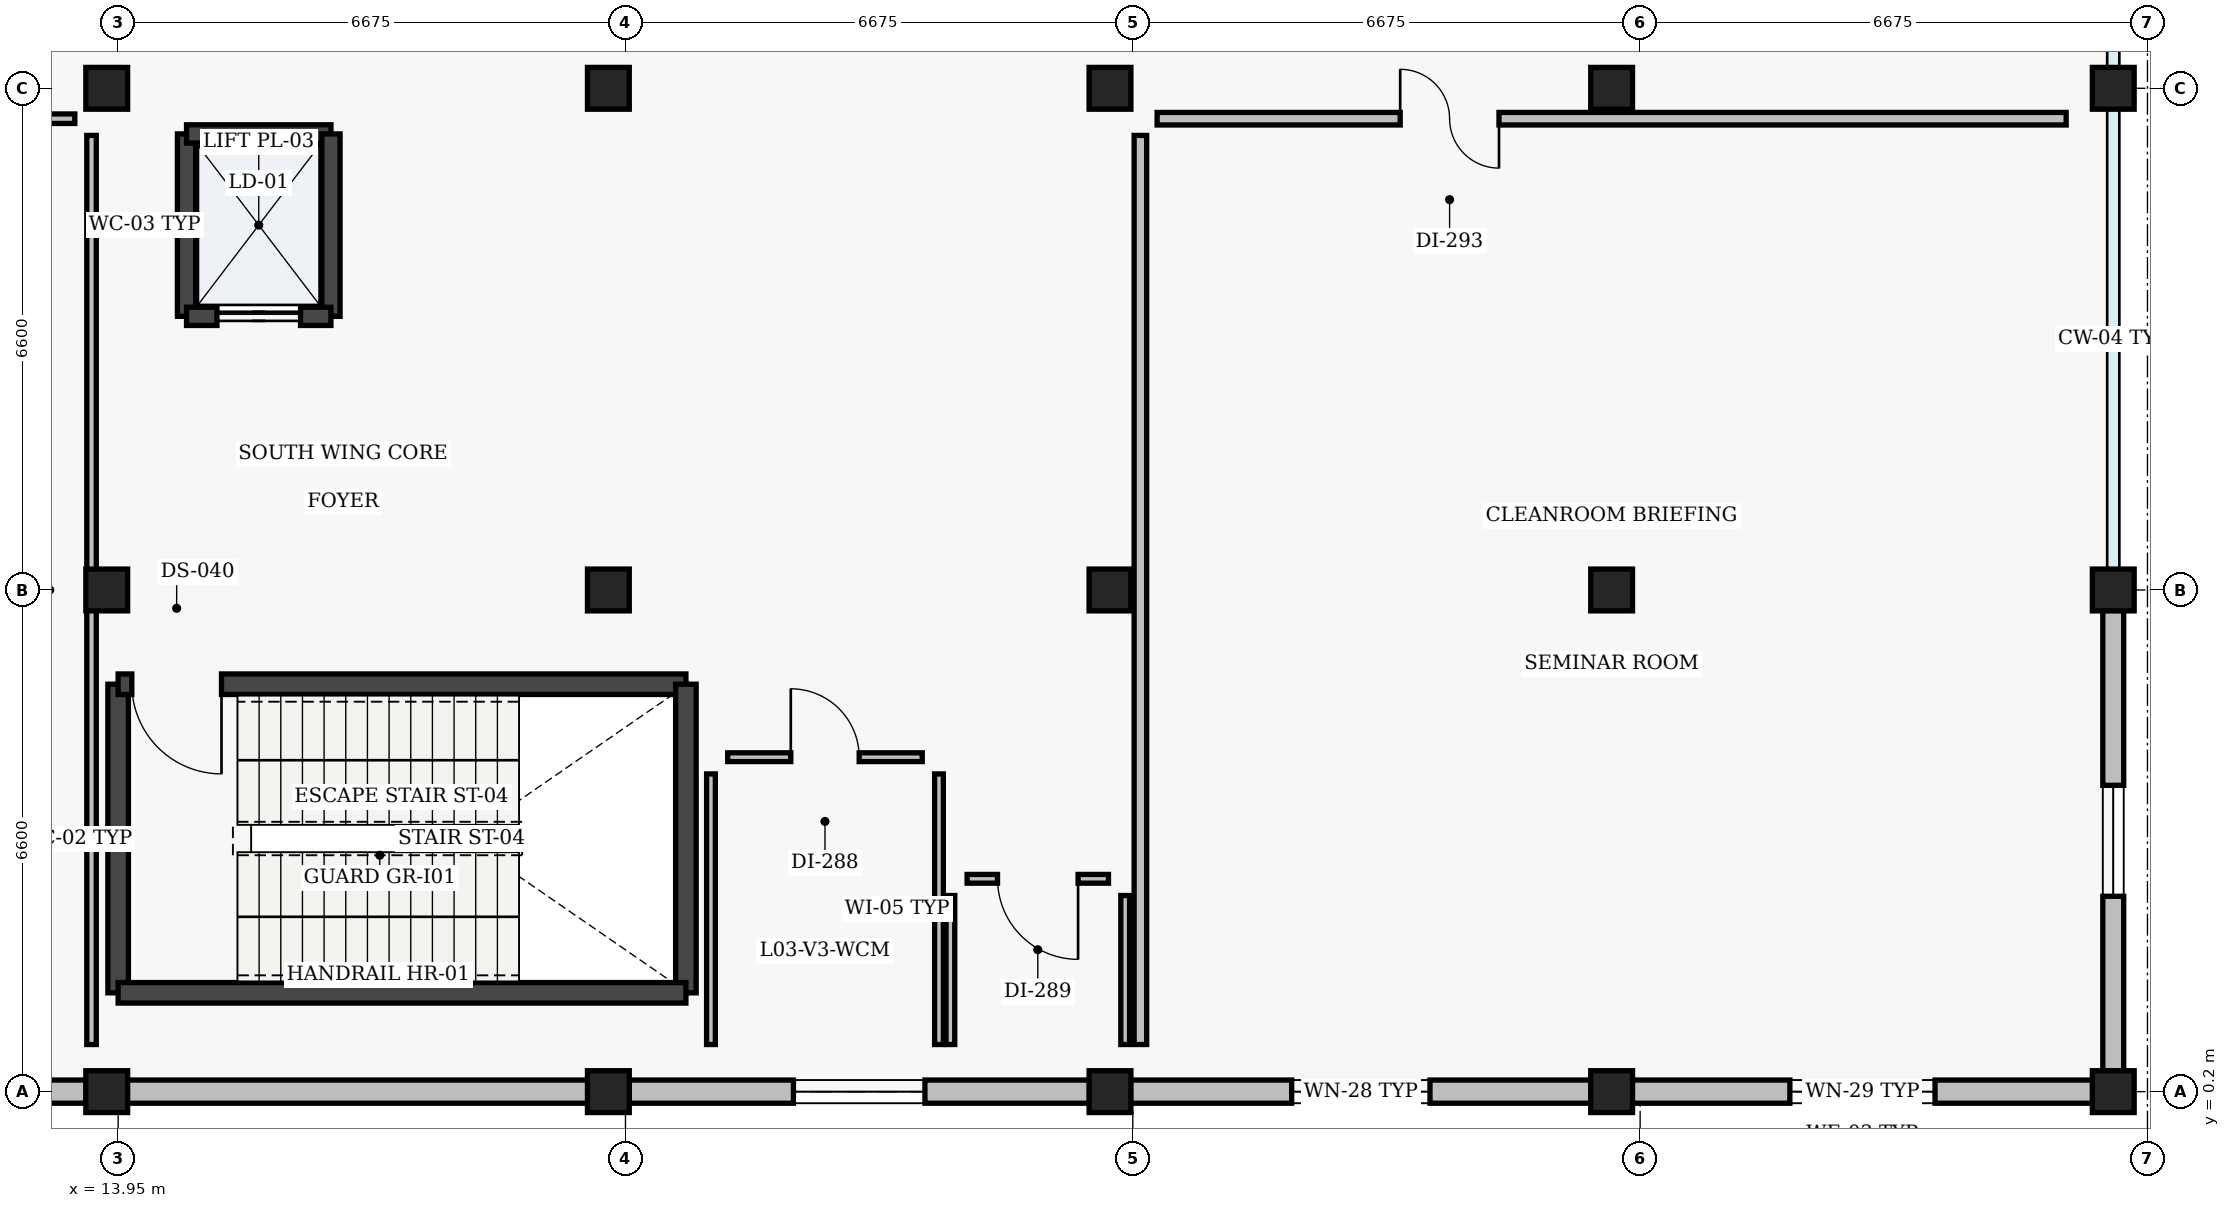
"""IFC4 building model, lengths in metres.
Left out: names, types, materials, properties, quantities, classifications, styles, units other than length and angle.
Written with IfcOpenShell. Run it as: python <this file> out.ifc"""

import sys

from ifc_helpers import new_model, si_unit, direction, frame, frame_2d, origin, origin_2d, place, context, subcontext, project, spatial, rectangle, extrude, element, fill, save


model = new_model("IFC4")
c1 = context("Model", 3, precision=1e-05, world=origin(), true_north=direction((0.0, 1.0)))
c2 = subcontext(c1, "Body", "Model", "MODEL_VIEW")
j1 = project(units=[si_unit("LENGTHUNIT", "METRE"), si_unit("PLANEANGLEUNIT", "RADIAN")], contexts=[c1])
p1 = place(None, origin())
s1 = spatial("IfcSite", under=j1, at=p1, CompositionType="ELEMENT")
p2 = place(p1, origin())
s2 = spatial("IfcBuilding", under=s1, at=p2, CompositionType="ELEMENT")
p3 = place(p2, frame((0.0, 0.0, 14.1)))
s3 = spatial("IfcBuildingStorey", under=s2, at=p3, CompositionType="ELEMENT", Elevation=14.1)
for number, where, z_axis, x_axis in (
    (1, (13.8, 0.2, 0.0), (0.0, 0.0, 1.0), (1.0, 0.0, 0.0)),
    (2, (13.8, 6.8, 0.0), (0.0, 0.0, 1.0), (1.0, 0.0, 0.0)),
    (3, (13.8, 13.4, 0.0), (0.0, 0.0, 1.0), (1.0, 0.0, 0.0)),
    (4, (20.4, 0.2, 0.0), (0.0, 0.0, 1.0), (1.0, 0.0, 0.0)),
    (5, (20.4, 6.8, 0.0), (0.0, 0.0, 1.0), (1.0, 0.0, 0.0)),
    (6, (20.4, 13.4, 0.0), (0.0, 0.0, 1.0), (1.0, 0.0, 0.0)),
    (7, (27.0, 0.2, 0.0), (0.0, 0.0, 1.0), (1.0, 0.0, 0.0)),
    (8, (27.0, 6.8, 0.0), (0.0, 0.0, 1.0), (1.0, 0.0, 0.0)),
    (9, (27.0, 13.4, 0.0), (0.0, 0.0, 1.0), (1.0, 0.0, 0.0)),
    (10, (33.6, 0.2, 0.0), (0.0, 0.0, 1.0), (1.0, 0.0, 0.0)),
    (11, (33.6, 6.8, 0.0), (0.0, 0.0, 1.0), (1.0, 0.0, 0.0)),
    (12, (33.6, 13.4, 0.0), (0.0, 0.0, 1.0), (1.0, 0.0, 0.0)),
    (13, (40.2, 0.2, 0.0), (0.0, 0.0, 1.0), (1.0, 0.0, 0.0)),
    (14, (40.2, 6.8, 0.0), (0.0, 0.0, 1.0), (1.0, 0.0, 0.0)),
    (15, (40.2, 13.4, 0.0), (0.0, 0.0, 1.0), (1.0, 0.0, 0.0)),
):
    element("IfcColumn", number, at=place(p3, frame(where, z_axis=z_axis, x_axis=x_axis)), inside=s3, PredefinedType="COLUMN", context=c2, shape_type="SweptSolid", body=[
        extrude(rectangle(XDim=0.55, YDim=0.55, at=origin_2d()), origin(), (0.0, 0.0, 1.0), 4.3),
    ])
p4 = place(p3, frame((40.2, 6.53, 0.0), z_axis=(0.0, 0.0, 1.0), x_axis=(0.0, -1.0, 0.0)))
e16 = element("IfcWall", 16, at=p4, inside=s3, PredefinedType="STANDARD", context=c2, shape_type="SweptSolid", body=[
    extrude(rectangle(XDim=6.06, YDim=0.275, at=frame_2d((3.03, 0.0))), origin(), (0.0, 0.0, 1.0), 3.785),
])
p5 = place(p4, frame((2.3, 0.0, 0.95)))
e17 = element("IfcOpeningElement", 17, at=p5, cuts=e16, PredefinedType="OPENING", context=c2, shape_type="SweptSolid", body=[
    extrude(rectangle(XDim=1.46, YDim=1.44, at=frame_2d((0.73, 0.72))), frame((0.0, 0.137, 0.0), z_axis=(0.0, -1.0, 0.0), x_axis=(1.0, 0.0, 0.0)), (0.0, 0.0, 1.0), 0.275),
])
p6 = place(p3, frame((39.93, 0.2, 0.0), z_axis=(0.0, 0.0, 1.0), x_axis=(-1.0, 0.0, 0.0)))
e18 = element("IfcWall", 18, at=p6, inside=s3, PredefinedType="STANDARD", context=c2, shape_type="SweptSolid", body=[
    extrude(rectangle(XDim=6.06, YDim=0.305, at=frame_2d((3.03, 0.0))), origin(), (0.0, 0.0, 1.0), 3.785),
])
p7 = place(p6, frame((2.075, 0.0, 0.95)))
e19 = element("IfcOpeningElement", 19, at=p7, cuts=e18, PredefinedType="OPENING", context=c2, shape_type="SweptSolid", body=[
    extrude(rectangle(XDim=1.91, YDim=1.4, at=frame_2d((0.955, 0.7))), frame((0.0, 0.152, 0.0), z_axis=(0.0, -1.0, 0.0), x_axis=(1.0, 0.0, 0.0)), (0.0, 0.0, 1.0), 0.305),
])
p8 = place(p3, frame((33.33, 0.2, 0.0), z_axis=(0.0, 0.0, 1.0), x_axis=(-1.0, 0.0, 0.0)))
e20 = element("IfcWall", 20, at=p8, inside=s3, PredefinedType="STANDARD", context=c2, shape_type="SweptSolid", body=[
    extrude(rectangle(XDim=6.06, YDim=0.305, at=frame_2d((3.03, 0.0))), origin(), (0.0, 0.0, 1.0), 3.785),
])
p9 = place(p8, frame((2.12, 0.0, 0.95)))
e21 = element("IfcOpeningElement", 21, at=p9, cuts=e20, PredefinedType="OPENING", context=c2, shape_type="SweptSolid", body=[
    extrude(rectangle(XDim=1.82, YDim=1.38, at=frame_2d((0.91, 0.69))), frame((0.0, 0.152, 0.0), z_axis=(0.0, -1.0, 0.0), x_axis=(1.0, 0.0, 0.0)), (0.0, 0.0, 1.0), 0.305),
])
p10 = place(p3, frame((26.73, 0.2, 0.0), z_axis=(0.0, 0.0, 1.0), x_axis=(-1.0, 0.0, 0.0)))
e22 = element("IfcWall", 22, at=p10, inside=s3, PredefinedType="STANDARD", context=c2, shape_type="SweptSolid", body=[
    extrude(rectangle(XDim=6.06, YDim=0.305, at=frame_2d((3.03, 0.0))), origin(), (0.0, 0.0, 1.0), 3.785),
])
p11 = place(p10, frame((2.165, 0.0, 0.95)))
e23 = element("IfcOpeningElement", 23, at=p11, cuts=e22, PredefinedType="OPENING", context=c2, shape_type="SweptSolid", body=[
    extrude(rectangle(XDim=1.73, YDim=1.36, at=frame_2d((0.865, 0.68))), frame((0.0, 0.152, 0.0), z_axis=(0.0, -1.0, 0.0), x_axis=(1.0, 0.0, 0.0)), (0.0, 0.0, 1.0), 0.305),
])
p12 = place(p3, frame((20.13, 0.2, 0.0), z_axis=(0.0, 0.0, 1.0), x_axis=(-1.0, 0.0, 0.0)))
e24 = element("IfcWall", 24, at=p12, inside=s3, PredefinedType="STANDARD", context=c2, shape_type="SweptSolid", body=[
    extrude(rectangle(XDim=6.06, YDim=0.305, at=frame_2d((3.03, 0.0))), origin(), (0.0, 0.0, 1.0), 3.785),
])
p13 = place(p3, frame((13.53, 0.2, 0.0), z_axis=(0.0, 0.0, 1.0), x_axis=(-1.0, 0.0, 0.0)))
e25 = element("IfcWall", 25, at=p13, inside=s3, PredefinedType="STANDARD", context=c2, shape_type="SweptSolid", body=[
    extrude(rectangle(XDim=6.06, YDim=0.305, at=frame_2d((3.03, 0.0))), origin(), (0.0, 0.0, 1.0), 3.785),
])
p14 = place(p13, frame((2.255, 0.0, 0.95)))
e26 = element("IfcOpeningElement", 26, at=p14, cuts=e25, PredefinedType="OPENING", context=c2, shape_type="SweptSolid", body=[
    extrude(rectangle(XDim=1.55, YDim=1.46, at=frame_2d((0.775, 0.73))), frame((0.0, 0.152, 0.0), z_axis=(0.0, -1.0, 0.0), x_axis=(1.0, 0.0, 0.0)), (0.0, 0.0, 1.0), 0.305),
])
p15 = place(p3, frame((13.95, 1.5, 0.0), z_axis=(0.0, 0.0, 1.0), x_axis=(0.0, 1.0, 0.0)))
e27 = element("IfcWall", 27, at=p15, inside=s3, PredefinedType="SHEAR", context=c2, shape_type="SweptSolid", body=[
    extrude(rectangle(XDim=4.06, YDim=0.27, at=frame_2d((2.03, 0.0))), origin(), (0.0, 0.0, 1.0), 4.28),
])
p16 = place(p3, frame((13.95, 5.56, 0.0), z_axis=(0.0, 0.0, 1.0), x_axis=(1.0, 0.0, 0.0)))
e28 = element("IfcWall", 28, at=p16, inside=s3, PredefinedType="SHEAR", context=c2, shape_type="SweptSolid", body=[
    extrude(rectangle(XDim=7.47, YDim=0.27, at=frame_2d((3.735, 0.0))), origin(), (0.0, 0.0, 1.0), 4.28),
])
p17 = place(p16, frame((0.18, 0.0, 0.0)))
e29 = element("IfcOpeningElement", 29, at=p17, cuts=e28, PredefinedType="OPENING", context=c2, shape_type="SweptSolid", body=[
    extrude(rectangle(XDim=1.18, YDim=2.15, at=frame_2d((0.59, 1.075))), frame((0.0, 0.135, 0.0), z_axis=(0.0, -1.0, 0.0), x_axis=(1.0, 0.0, 0.0)), (0.0, 0.0, 1.0), 0.27),
])
p18 = place(p3, frame((21.42, 5.56, 0.0), z_axis=(0.0, 0.0, 1.0), x_axis=(0.0, -1.0, 0.0)))
e30 = element("IfcWall", 30, at=p18, inside=s3, PredefinedType="SHEAR", context=c2, shape_type="SweptSolid", body=[
    extrude(rectangle(XDim=4.06, YDim=0.27, at=frame_2d((2.03, 0.0))), origin(), (0.0, 0.0, 1.0), 4.28),
])
p19 = place(p3, frame((21.42, 1.5, 0.0), z_axis=(0.0, 0.0, 1.0), x_axis=(-1.0, 0.0, 0.0)))
e31 = element("IfcWall", 31, at=p19, inside=s3, PredefinedType="SHEAR", context=c2, shape_type="SweptSolid", body=[
    extrude(rectangle(XDim=7.47, YDim=0.27, at=frame_2d((3.735, 0.0))), origin(), (0.0, 0.0, 1.0), 4.28),
])
p20 = place(p3, frame((14.85, 10.4, 0.0), z_axis=(0.0, 0.0, 1.0), x_axis=(0.0, 1.0, 0.0)))
e32 = element("IfcWall", 32, at=p20, inside=s3, PredefinedType="SHEAR", context=c2, shape_type="SweptSolid", body=[
    extrude(rectangle(XDim=2.4, YDim=0.24, at=frame_2d((1.2, 0.0))), origin(), (0.0, 0.0, 1.0), 4.28),
])
p21 = place(p3, frame((14.85, 12.8, 0.0), z_axis=(0.0, 0.0, 1.0), x_axis=(1.0, 0.0, 0.0)))
e33 = element("IfcWall", 33, at=p21, inside=s3, PredefinedType="SHEAR", context=c2, shape_type="SweptSolid", body=[
    extrude(rectangle(XDim=1.9, YDim=0.24, at=frame_2d((0.95, 0.0))), origin(), (0.0, 0.0, 1.0), 4.28),
])
p22 = place(p3, frame((16.75, 12.8, 0.0), z_axis=(0.0, 0.0, 1.0), x_axis=(0.0, -1.0, 0.0)))
e34 = element("IfcWall", 34, at=p22, inside=s3, PredefinedType="SHEAR", context=c2, shape_type="SweptSolid", body=[
    extrude(rectangle(XDim=2.4, YDim=0.24, at=frame_2d((1.2, 0.0))), origin(), (0.0, 0.0, 1.0), 4.28),
])
p23 = place(p3, frame((16.75, 10.4, 0.0), z_axis=(0.0, 0.0, 1.0), x_axis=(-1.0, 0.0, 0.0)))
e35 = element("IfcWall", 35, at=p23, inside=s3, PredefinedType="SHEAR", context=c2, shape_type="SweptSolid", body=[
    extrude(rectangle(XDim=1.9, YDim=0.24, at=frame_2d((0.95, 0.0))), origin(), (0.0, 0.0, 1.0), 4.28),
])
p24 = place(p23, frame((0.4, 0.0, 0.0)))
e36 = element("IfcOpeningElement", 36, at=p24, cuts=e35, PredefinedType="OPENING", context=c2, shape_type="SweptSolid", body=[
    extrude(rectangle(XDim=1.1, YDim=2.2, at=frame_2d((0.55, 1.1))), frame((0.0, 0.12, 0.0), z_axis=(0.0, -1.0, 0.0), x_axis=(1.0, 0.0, 0.0)), (0.0, 0.0, 1.0), 0.24),
])
p25 = place(p3, frame((24.75, 0.82, 0.0), z_axis=(0.0, 0.0, 1.0), x_axis=(0.0, 1.0, 0.0)))
e37 = element("IfcWall", 37, at=p25, inside=s3, PredefinedType="PARTITIONING", context=c2, shape_type="SweptSolid", body=[
    extrude(rectangle(XDim=3.56, YDim=0.115, at=frame_2d((1.78, 0.0))), origin(), (0.0, 0.0, 1.0), 3.95),
])
p26 = place(p3, frame((24.53, 4.6, 0.0), z_axis=(0.0, 0.0, 1.0), x_axis=(-1.0, 0.0, 0.0)))
e38 = element("IfcWall", 38, at=p26, inside=s3, PredefinedType="PARTITIONING", context=c2, shape_type="SweptSolid", body=[
    extrude(rectangle(XDim=2.56, YDim=0.115, at=frame_2d((1.28, 0.0))), origin(), (0.0, 0.0, 1.0), 3.95),
])
p27 = place(p26, frame((0.83, 0.0, 0.0)))
e39 = element("IfcOpeningElement", 39, at=p27, cuts=e38, PredefinedType="OPENING", context=c2, shape_type="SweptSolid", body=[
    extrude(rectangle(XDim=0.9, YDim=2.1, at=frame_2d((0.45, 1.05))), frame((0.0, 0.058, 0.0), z_axis=(0.0, -1.0, 0.0), x_axis=(1.0, 0.0, 0.0)), (0.0, 0.0, 1.0), 0.115),
])
p28 = place(p3, frame((21.75, 4.38, 0.0), z_axis=(0.0, 0.0, 1.0), x_axis=(0.0, -1.0, 0.0)))
e40 = element("IfcWall", 40, at=p28, inside=s3, PredefinedType="PARTITIONING", context=c2, shape_type="SweptSolid", body=[
    extrude(rectangle(XDim=3.56, YDim=0.115, at=frame_2d((1.78, 0.0))), origin(), (0.0, 0.0, 1.0), 3.95),
])
p29 = place(p3, frame((27.2, 0.82, 0.0), z_axis=(0.0, 0.0, 1.0), x_axis=(0.0, 1.0, 0.0)))
e41 = element("IfcWall", 41, at=p29, inside=s3, PredefinedType="PARTITIONING", context=c2, shape_type="SweptSolid", body=[
    extrude(rectangle(XDim=1.96, YDim=0.115, at=frame_2d((0.98, 0.0))), origin(), (0.0, 0.0, 1.0), 3.685),
])
p30 = place(p3, frame((26.98, 3.0, 0.0), z_axis=(0.0, 0.0, 1.0), x_axis=(-1.0, 0.0, 0.0)))
e42 = element("IfcWall", 42, at=p30, inside=s3, PredefinedType="PARTITIONING", context=c2, shape_type="SweptSolid", body=[
    extrude(rectangle(XDim=1.86, YDim=0.115, at=frame_2d((0.93, 0.0))), origin(), (0.0, 0.0, 1.0), 3.95),
])
p31 = place(p30, frame((0.4, 0.0, 0.0)))
e43 = element("IfcOpeningElement", 43, at=p31, cuts=e42, PredefinedType="OPENING", context=c2, shape_type="SweptSolid", body=[
    extrude(rectangle(XDim=1.06, YDim=2.12, at=frame_2d((0.53, 1.06))), frame((0.0, 0.058, 0.0), z_axis=(0.0, -1.0, 0.0), x_axis=(1.0, 0.0, 0.0)), (0.0, 0.0, 1.0), 0.115),
])
p32 = place(p3, frame((24.9, 2.78, 0.0), z_axis=(0.0, 0.0, 1.0), x_axis=(0.0, -1.0, 0.0)))
e44 = element("IfcWall", 44, at=p32, inside=s3, PredefinedType="PARTITIONING", context=c2, shape_type="SweptSolid", body=[
    extrude(rectangle(XDim=1.96, YDim=0.115, at=frame_2d((0.98, 0.0))), origin(), (0.0, 0.0, 1.0), 3.95),
])
p33 = place(p3, frame((13.6, 0.82, 0.0), z_axis=(0.0, 0.0, 1.0), x_axis=(0.0, 1.0, 0.0)))
e45 = element("IfcWall", 45, at=p33, inside=s3, PredefinedType="PARTITIONING", context=c2, shape_type="SweptSolid", body=[
    extrude(rectangle(XDim=11.96, YDim=0.125, at=frame_2d((5.98, 0.0))), origin(), (0.0, 0.0, 1.0), 3.685),
])
p34 = place(p3, frame((13.38, 13.0, 0.0), z_axis=(0.0, 0.0, 1.0), x_axis=(-1.0, 0.0, 0.0)))
e46 = element("IfcWall", 46, at=p34, inside=s3, PredefinedType="PARTITIONING", context=c2, shape_type="SweptSolid", body=[
    extrude(rectangle(XDim=12.16, YDim=0.125, at=frame_2d((6.08, 0.0))), origin(), (0.0, 0.0, 1.0), 3.95),
])
p35 = place(p34, frame((4.488, 0.0, 0.0)))
e47 = element("IfcOpeningElement", 47, at=p35, cuts=e46, PredefinedType="OPENING", context=c2, shape_type="SweptSolid", body=[
    extrude(rectangle(XDim=0.94, YDim=2.12, at=frame_2d((0.47, 1.06))), frame((0.0, 0.062, 0.0), z_axis=(0.0, -1.0, 0.0), x_axis=(1.0, 0.0, 0.0)), (0.0, 0.0, 1.0), 0.125),
])
p36 = place(p3, frame((39.58, 13.0, 0.0), z_axis=(0.0, 0.0, 1.0), x_axis=(-1.0, 0.0, 0.0)))
e48 = element("IfcWall", 48, at=p36, inside=s3, PredefinedType="PARTITIONING", context=c2, shape_type="SweptSolid", body=[
    extrude(rectangle(XDim=11.96, YDim=0.165, at=frame_2d((5.98, 0.0))), origin(), (0.0, 0.0, 1.0), 3.95),
])
p37 = place(p36, frame((7.462, 0.0, 0.0)))
e49 = element("IfcOpeningElement", 49, at=p37, cuts=e48, PredefinedType="OPENING", context=c2, shape_type="SweptSolid", body=[
    extrude(rectangle(XDim=1.3, YDim=2.18, at=frame_2d((0.65, 1.09))), frame((0.0, 0.083, 0.0), z_axis=(0.0, -1.0, 0.0), x_axis=(1.0, 0.0, 0.0)), (0.0, 0.0, 1.0), 0.165),
])
p38 = place(p3, frame((27.4, 12.78, 0.0), z_axis=(0.0, 0.0, 1.0), x_axis=(0.0, -1.0, 0.0)))
e50 = element("IfcWall", 50, at=p38, inside=s3, PredefinedType="PARTITIONING", context=c2, shape_type="SweptSolid", body=[
    extrude(rectangle(XDim=11.96, YDim=0.165, at=frame_2d((5.98, 0.0))), origin(), (0.0, 0.0, 1.0), 3.95),
])
p39 = place(p5, origin())
e51 = element("IfcWindow", 51, at=p39, inside=s3, PartitioningType="SINGLE_PANEL", PredefinedType="WINDOW", context=c2, shape_type="SweptSolid", body=[
    extrude(rectangle(XDim=1.46, YDim=1.44, at=frame_2d((0.73, 0.72))), frame((0.0, 0.03, 0.0), z_axis=(0.0, -1.0, 0.0), x_axis=(1.0, 0.0, 0.0)), (0.0, 0.0, 1.0), 0.06),
])
fill(e17, e51)
p40 = place(p7, origin())
e52 = element("IfcWindow", 52, at=p40, inside=s3, PartitioningType="SINGLE_PANEL", PredefinedType="WINDOW", context=c2, shape_type="SweptSolid", body=[
    extrude(rectangle(XDim=1.91, YDim=1.4, at=frame_2d((0.955, 0.7))), frame((0.0, 0.03, 0.0), z_axis=(0.0, -1.0, 0.0), x_axis=(1.0, 0.0, 0.0)), (0.0, 0.0, 1.0), 0.06),
])
fill(e19, e52)
p41 = place(p9, origin())
e53 = element("IfcWindow", 53, at=p41, inside=s3, PartitioningType="SINGLE_PANEL", PredefinedType="WINDOW", context=c2, shape_type="SweptSolid", body=[
    extrude(rectangle(XDim=1.82, YDim=1.38, at=frame_2d((0.91, 0.69))), frame((0.0, 0.03, 0.0), z_axis=(0.0, -1.0, 0.0), x_axis=(1.0, 0.0, 0.0)), (0.0, 0.0, 1.0), 0.06),
])
fill(e21, e53)
p42 = place(p11, origin())
e54 = element("IfcWindow", 54, at=p42, inside=s3, PartitioningType="SINGLE_PANEL", PredefinedType="WINDOW", context=c2, shape_type="SweptSolid", body=[
    extrude(rectangle(XDim=1.73, YDim=1.36, at=frame_2d((0.865, 0.68))), frame((0.0, 0.03, 0.0), z_axis=(0.0, -1.0, 0.0), x_axis=(1.0, 0.0, 0.0)), (0.0, 0.0, 1.0), 0.06),
])
fill(e23, e54)
p43 = place(p17, origin())
e55 = element("IfcDoor", 55, at=p43, inside=s3, OperationType="SINGLE_SWING_RIGHT", PredefinedType="DOOR", context=c2, shape_type="SweptSolid", body=[
    extrude(rectangle(XDim=1.18, YDim=2.15, at=frame_2d((0.59, 1.075))), frame((0.0, 0.025, 0.0), z_axis=(0.0, -1.0, 0.0), x_axis=(1.0, 0.0, 0.0)), (0.0, 0.0, 1.0), 0.05),
])
fill(e29, e55)
p44 = place(p24, origin())
e56 = element("IfcDoor", 56, at=p44, inside=s3, OperationType="SLIDING_TO_LEFT", PredefinedType="DOOR", context=c2, shape_type="SweptSolid", body=[
    extrude(rectangle(XDim=1.1, YDim=2.2, at=frame_2d((0.55, 1.1))), frame((0.0, 0.025, 0.0), z_axis=(0.0, -1.0, 0.0), x_axis=(1.0, 0.0, 0.0)), (0.0, 0.0, 1.0), 0.05),
])
fill(e36, e56)
p45 = place(p27, origin())
e57 = element("IfcDoor", 57, at=p45, inside=s3, OperationType="SINGLE_SWING_RIGHT", PredefinedType="DOOR", context=c2, shape_type="SweptSolid", body=[
    extrude(rectangle(XDim=0.9, YDim=2.1, at=frame_2d((0.45, 1.05))), frame((0.0, 0.025, 0.0), z_axis=(0.0, -1.0, 0.0), x_axis=(1.0, 0.0, 0.0)), (0.0, 0.0, 1.0), 0.05),
])
fill(e39, e57)
p46 = place(p31, origin())
e58 = element("IfcDoor", 58, at=p46, inside=s3, OperationType="SINGLE_SWING_LEFT", PredefinedType="DOOR", context=c2, shape_type="SweptSolid", body=[
    extrude(rectangle(XDim=1.06, YDim=2.12, at=frame_2d((0.53, 1.06))), frame((0.0, 0.025, 0.0), z_axis=(0.0, -1.0, 0.0), x_axis=(1.0, 0.0, 0.0)), (0.0, 0.0, 1.0), 0.05),
])
fill(e43, e58)
p47 = place(p37, origin())
e59 = element("IfcDoor", 59, at=p47, inside=s3, OperationType="DOUBLE_DOOR_SINGLE_SWING", PredefinedType="DOOR", context=c2, shape_type="SweptSolid", body=[
    extrude(rectangle(XDim=1.3, YDim=2.18, at=frame_2d((0.65, 1.09))), frame((0.0, 0.025, 0.0), z_axis=(0.0, -1.0, 0.0), x_axis=(1.0, 0.0, 0.0)), (0.0, 0.0, 1.0), 0.05),
])
fill(e49, e59)
save(model, sys.argv[1])
